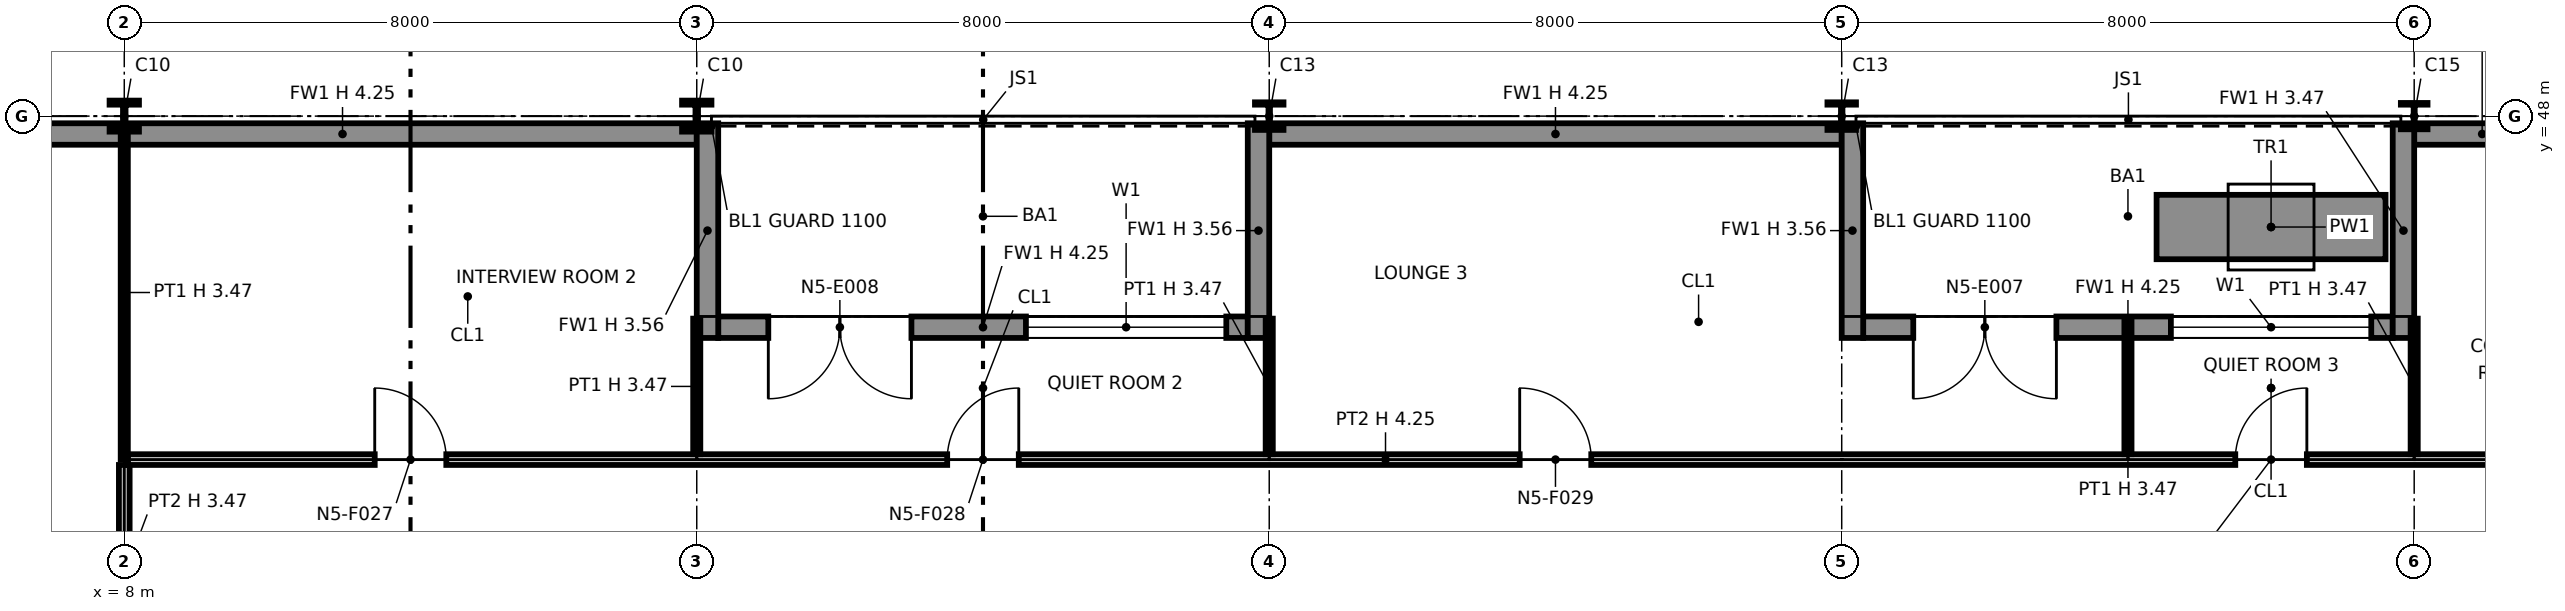
"""IFC4 building model, lengths in metres.
Left out: names, types, materials, properties, quantities, classifications, styles, units other than length and angle.
Written with IfcOpenShell. Run it as: python <this file> out.ifc"""

import sys

from ifc_helpers import new_model, si_unit, direction, frame, frame_2d, origin, origin_2d, place, context, subcontext, project, spatial, rectangle, i_section, extrude, element, fill, save


model = new_model("IFC4")
c1 = context("Model", 3, precision=1e-05, world=origin(), true_north=direction((0.0, 1.0)))
c2 = subcontext(c1, "Body", "Model", "MODEL_VIEW")
j1 = project(units=[si_unit("LENGTHUNIT", "METRE"), si_unit("PLANEANGLEUNIT", "RADIAN")], contexts=[c1])
p1 = place(None, origin())
s1 = spatial("IfcSite", under=j1, at=p1, CompositionType="ELEMENT")
p2 = place(p1, origin())
s2 = spatial("IfcBuilding", under=s1, at=p2, CompositionType="ELEMENT")
p3 = place(p2, frame((0.0, 0.0, 87.6)))
s3 = spatial("IfcBuildingStorey", under=s2, at=p3, CompositionType="ELEMENT", Elevation=87.6)
for number, where, z_axis, x_axis in (
    (1, (8.0, 48.0, 0.0), (0.0, 0.0, 1.0), (1.0, 0.0, 0.0)),
    (2, (16.0, 48.0, 0.0), (0.0, 0.0, 1.0), (1.0, 0.0, 0.0)),
):
    element("IfcColumn", number, at=place(p3, frame(where, z_axis=z_axis, x_axis=x_axis)), inside=s3, PredefinedType="COLUMN", context=c2, shape_type="SweptSolid", body=[
        extrude(i_section(OverallWidth=0.411, OverallDepth=0.434, WebThickness=0.036, FlangeThickness=0.057, at=origin_2d()), origin(), (0.0, 0.0, 1.0), 4.25),
    ])
for number, where, z_axis, x_axis in (
    (3, (24.0, 48.0, 0.0), (0.0, 0.0, 1.0), (1.0, 0.0, 0.0)),
    (4, (32.0, 48.0, 0.0), (0.0, 0.0, 1.0), (1.0, 0.0, 0.0)),
):
    element("IfcColumn", number, at=place(p3, frame(where, z_axis=z_axis, x_axis=x_axis)), inside=s3, PredefinedType="COLUMN", context=c2, shape_type="SweptSolid", body=[
        extrude(i_section(OverallWidth=0.399, OverallDepth=0.386, WebThickness=0.021, FlangeThickness=0.033, at=origin_2d()), origin(), (0.0, 0.0, 1.0), 4.25),
    ])
p4 = place(p3, frame((40.0, 48.0, 0.0), z_axis=(0.0, 0.0, 1.0), x_axis=(1.0, 0.0, 0.0)))
e5 = element("IfcColumn", 5, at=p4, inside=s3, PredefinedType="COLUMN", context=c2, shape_type="SweptSolid", body=[
    extrude(i_section(OverallWidth=0.373, OverallDepth=0.368, WebThickness=0.015, FlangeThickness=0.024, at=origin_2d()), origin(), (0.0, 0.0, 1.0), 4.25),
])
p5 = place(p3, frame((41.9, 47.75, 0.0), z_axis=(0.0, 0.0, 1.0), x_axis=(-1.0, 0.0, 0.0)))
e6 = element("IfcWall", 6, at=p5, inside=s3, PredefinedType="SOLIDWALL", context=c2, shape_type="SweptSolid", body=[
    extrude(rectangle(XDim=1.9, YDim=0.3, at=frame_2d((0.95, 0.0))), origin(), (0.0, 0.0, 1.0), 4.25),
])
p6 = place(p3, frame((39.7, 45.05, 0.0), z_axis=(0.0, 0.0, 1.0), x_axis=(-1.0, 0.0, 0.0)))
e7 = element("IfcWall", 7, at=p6, inside=s3, PredefinedType="SOLIDWALL", context=c2, shape_type="SweptSolid", body=[
    extrude(rectangle(XDim=7.4, YDim=0.3, at=frame_2d((3.7, 0.0))), origin(), (0.0, 0.0, 1.0), 4.25),
])
p7 = place(p6, frame((0.3, 0.0, 0.9)))
e8 = element("IfcOpeningElement", 8, at=p7, cuts=e7, PredefinedType="OPENING", context=c2, shape_type="SweptSolid", body=[
    extrude(rectangle(XDim=2.8, YDim=2.2, at=frame_2d((1.4, 1.1))), frame((0.0, 0.16, 0.0), z_axis=(0.0, -1.0, 0.0), x_axis=(1.0, 0.0, 0.0)), (0.0, 0.0, 1.0), 0.32),
])
p8 = place(p6, frame((4.7, 0.0, 0.0)))
e9 = element("IfcOpeningElement", 9, at=p8, cuts=e7, PredefinedType="OPENING", context=c2, shape_type="SweptSolid", body=[
    extrude(rectangle(XDim=2.0, YDim=2.4, at=frame_2d((1.0, 1.2))), frame((0.0, 0.16, 0.0), z_axis=(0.0, -1.0, 0.0), x_axis=(1.0, 0.0, 0.0)), (0.0, 0.0, 1.0), 0.32),
])
p9 = place(p3, frame((39.85, 47.9, 0.0), z_axis=(0.0, 0.0, 1.0), x_axis=(0.0, -1.0, 0.0)))
e10 = element("IfcWall", 10, at=p9, inside=s3, PredefinedType="SOLIDWALL", context=c2, shape_type="SweptSolid", body=[
    extrude(rectangle(XDim=3.0, YDim=0.3, at=frame_2d((1.5, 0.0))), origin(), (0.0, 0.0, 1.0), 3.469),
])
p10 = place(p3, frame((32.15, 47.9, 0.0), z_axis=(0.0, 0.0, 1.0), x_axis=(0.0, -1.0, 0.0)))
e11 = element("IfcWall", 11, at=p10, inside=s3, PredefinedType="SOLIDWALL", context=c2, shape_type="SweptSolid", body=[
    extrude(rectangle(XDim=3.0, YDim=0.3, at=frame_2d((1.5, 0.0))), origin(), (0.0, 0.0, 1.0), 3.556),
])
p11 = place(p3, frame((32.0, 47.75, 0.0), z_axis=(0.0, 0.0, 1.0), x_axis=(-1.0, 0.0, 0.0)))
e12 = element("IfcWall", 12, at=p11, inside=s3, PredefinedType="SOLIDWALL", context=c2, shape_type="SweptSolid", body=[
    extrude(rectangle(XDim=8.0, YDim=0.3, at=frame_2d((4.0, 0.0))), origin(), (0.0, 0.0, 1.0), 4.25),
])
p12 = place(p3, frame((23.7, 45.05, 0.0), z_axis=(0.0, 0.0, 1.0), x_axis=(-1.0, 0.0, 0.0)))
e13 = element("IfcWall", 13, at=p12, inside=s3, PredefinedType="SOLIDWALL", context=c2, shape_type="SweptSolid", body=[
    extrude(rectangle(XDim=7.4, YDim=0.3, at=frame_2d((3.7, 0.0))), origin(), (0.0, 0.0, 1.0), 4.25),
])
p13 = place(p12, frame((0.3, 0.0, 0.9)))
e14 = element("IfcOpeningElement", 14, at=p13, cuts=e13, PredefinedType="OPENING", context=c2, shape_type="SweptSolid", body=[
    extrude(rectangle(XDim=2.8, YDim=2.2, at=frame_2d((1.4, 1.1))), frame((0.0, 0.16, 0.0), z_axis=(0.0, -1.0, 0.0), x_axis=(1.0, 0.0, 0.0)), (0.0, 0.0, 1.0), 0.32),
])
p14 = place(p12, frame((4.7, 0.0, 0.0)))
e15 = element("IfcOpeningElement", 15, at=p14, cuts=e13, PredefinedType="OPENING", context=c2, shape_type="SweptSolid", body=[
    extrude(rectangle(XDim=2.0, YDim=2.4, at=frame_2d((1.0, 1.2))), frame((0.0, 0.16, 0.0), z_axis=(0.0, -1.0, 0.0), x_axis=(1.0, 0.0, 0.0)), (0.0, 0.0, 1.0), 0.32),
])
for number, where, z_axis, x_axis in (
    (16, (23.85, 47.9, 0.0), (0.0, 0.0, 1.0), (0.0, -1.0, 0.0)),
    (17, (16.15, 47.9, 0.0), (0.0, 0.0, 1.0), (0.0, -1.0, 0.0)),
):
    element("IfcWall", number, at=place(p3, frame(where, z_axis=z_axis, x_axis=x_axis)), inside=s3, PredefinedType="SOLIDWALL", context=c2, shape_type="SweptSolid", body=[
        extrude(rectangle(XDim=3.0, YDim=0.3, at=frame_2d((1.5, 0.0))), origin(), (0.0, 0.0, 1.0), 3.556),
    ])
p15 = place(p3, frame((16.0, 47.75, 0.0), z_axis=(0.0, 0.0, 1.0), x_axis=(-1.0, 0.0, 0.0)))
e18 = element("IfcWall", 18, at=p15, inside=s3, PredefinedType="SOLIDWALL", context=c2, shape_type="SweptSolid", body=[
    extrude(rectangle(XDim=9.9, YDim=0.3, at=frame_2d((4.95, 0.0))), origin(), (0.0, 0.0, 1.0), 4.25),
])
p16 = place(p3, frame((39.6, 46.45, 0.0), z_axis=(0.0, 0.0, 1.0), x_axis=(-1.0, 0.0, 0.0)))
e19 = element("IfcWall", 19, at=p16, inside=s3, PredefinedType="SOLIDWALL", context=c2, shape_type="SweptSolid", body=[
    extrude(rectangle(XDim=3.2, YDim=0.9, at=frame_2d((1.6, 0.0))), origin(), (0.0, 0.0, 1.0), 0.6),
])
p17 = place(p3, frame((8.0, 40.03, 0.0), z_axis=(0.0, 0.0, 1.0), x_axis=(0.0, 1.0, 0.0)))
e20 = element("IfcWall", 20, at=p17, inside=s3, PredefinedType="PARTITIONING", context=c2, shape_type="SweptSolid", body=[
    extrude(rectangle(XDim=3.095, YDim=0.15, at=frame_2d((1.547, 0.0))), origin(), (0.0, 0.0, 1.0), 3.47),
])
p18 = place(p17, frame((1.07, 0.0, 0.0)))
e21 = element("IfcOpeningElement", 21, at=p18, cuts=e20, PredefinedType="OPENING", context=c2, shape_type="SweptSolid", body=[
    extrude(rectangle(XDim=1.0, YDim=2.1, at=frame_2d((0.5, 1.05))), frame((0.0, 0.085, 0.0), z_axis=(0.0, -1.0, 0.0), x_axis=(1.0, 0.0, 0.0)), (0.0, 0.0, 1.0), 0.17),
])
p19 = place(p3, frame((8.05, 43.2, 0.0), z_axis=(0.0, 0.0, 1.0), x_axis=(1.0, 0.0, 0.0)))
e22 = element("IfcWall", 22, at=p19, inside=s3, PredefinedType="PARTITIONING", context=c2, shape_type="SweptSolid", body=[
    extrude(rectangle(XDim=35.15, YDim=0.15, at=frame_2d((17.575, 0.0))), origin(), (0.0, 0.0, 1.0), 4.25),
])
p20 = place(p19, frame((3.45, 0.0, 0.0)))
e23 = element("IfcOpeningElement", 23, at=p20, cuts=e22, PredefinedType="OPENING", context=c2, shape_type="SweptSolid", body=[
    extrude(rectangle(XDim=1.0, YDim=2.1, at=frame_2d((0.5, 1.05))), frame((0.0, 0.085, 0.0), z_axis=(0.0, -1.0, 0.0), x_axis=(1.0, 0.0, 0.0)), (0.0, 0.0, 1.0), 0.17),
])
p21 = place(p19, frame((11.45, 0.0, 0.0)))
e24 = element("IfcOpeningElement", 24, at=p21, cuts=e22, PredefinedType="OPENING", context=c2, shape_type="SweptSolid", body=[
    extrude(rectangle(XDim=1.0, YDim=2.1, at=frame_2d((0.5, 1.05))), frame((0.0, 0.085, 0.0), z_axis=(0.0, -1.0, 0.0), x_axis=(1.0, 0.0, 0.0)), (0.0, 0.0, 1.0), 0.17),
])
p22 = place(p19, frame((19.45, 0.0, 0.0)))
e25 = element("IfcOpeningElement", 25, at=p22, cuts=e22, PredefinedType="OPENING", context=c2, shape_type="SweptSolid", body=[
    extrude(rectangle(XDim=1.0, YDim=2.1, at=frame_2d((0.5, 1.05))), frame((0.0, 0.085, 0.0), z_axis=(0.0, -1.0, 0.0), x_axis=(1.0, 0.0, 0.0)), (0.0, 0.0, 1.0), 0.17),
])
p23 = place(p19, frame((29.45, 0.0, 0.0)))
e26 = element("IfcOpeningElement", 26, at=p23, cuts=e22, PredefinedType="OPENING", context=c2, shape_type="SweptSolid", body=[
    extrude(rectangle(XDim=1.0, YDim=2.1, at=frame_2d((0.5, 1.05))), frame((0.0, 0.085, 0.0), z_axis=(0.0, -1.0, 0.0), x_axis=(1.0, 0.0, 0.0)), (0.0, 0.0, 1.0), 0.17),
])
p24 = place(p3, frame((8.0, 43.2, 0.0), z_axis=(0.0, 0.0, 1.0), x_axis=(0.0, 1.0, 0.0)))
e27 = element("IfcWall", 27, at=p24, inside=s3, PredefinedType="PARTITIONING", context=c2, shape_type="SweptSolid", body=[
    extrude(rectangle(XDim=4.67, YDim=0.1, at=frame_2d((2.335, 0.0))), origin(), (0.0, 0.0, 1.0), 3.47),
])
for number, where, z_axis, x_axis in (
    (28, (16.0, 43.275, 0.0), (0.0, 0.0, 1.0), (0.0, 1.0, 0.0)),
    (29, (24.0, 43.275, 0.0), (0.0, 0.0, 1.0), (0.0, 1.0, 0.0)),
    (30, (36.0, 43.275, 0.0), (0.0, 0.0, 1.0), (0.0, 1.0, 0.0)),
    (31, (40.0, 43.275, 0.0), (0.0, 0.0, 1.0), (0.0, 1.0, 0.0)),
):
    element("IfcWall", number, at=place(p3, frame(where, z_axis=z_axis, x_axis=x_axis)), inside=s3, PredefinedType="PARTITIONING", context=c2, shape_type="SweptSolid", body=[
        extrude(rectangle(XDim=1.895, YDim=0.1, at=frame_2d((0.948, 0.0))), origin(), (0.0, 0.0, 1.0), 3.47),
    ])
p25 = place(p7, origin())
e32 = element("IfcWindow", 32, at=p25, inside=s3, PartitioningType="SINGLE_PANEL", PredefinedType="WINDOW", context=c2, shape_type="SweptSolid", body=[
    extrude(rectangle(XDim=2.8, YDim=2.2, at=frame_2d((1.4, 1.1))), frame((0.0, 0.03, 0.0), z_axis=(0.0, -1.0, 0.0), x_axis=(1.0, 0.0, 0.0)), (0.0, 0.0, 1.0), 0.06),
])
fill(e8, e32)
p26 = place(p8, origin())
e33 = element("IfcDoor", 33, at=p26, inside=s3, OperationType="DOUBLE_DOOR_SINGLE_SWING", PredefinedType="DOOR", context=c2, shape_type="SweptSolid", body=[
    extrude(rectangle(XDim=2.0, YDim=2.4, at=frame_2d((1.0, 1.2))), frame((0.0, 0.025, 0.0), z_axis=(0.0, -1.0, 0.0), x_axis=(1.0, 0.0, 0.0)), (0.0, 0.0, 1.0), 0.05),
])
fill(e9, e33)
p27 = place(p13, origin())
e34 = element("IfcWindow", 34, at=p27, inside=s3, PartitioningType="SINGLE_PANEL", PredefinedType="WINDOW", context=c2, shape_type="SweptSolid", body=[
    extrude(rectangle(XDim=2.8, YDim=2.2, at=frame_2d((1.4, 1.1))), frame((0.0, 0.03, 0.0), z_axis=(0.0, -1.0, 0.0), x_axis=(1.0, 0.0, 0.0)), (0.0, 0.0, 1.0), 0.06),
])
fill(e14, e34)
p28 = place(p14, origin())
e35 = element("IfcDoor", 35, at=p28, inside=s3, OperationType="DOUBLE_DOOR_SINGLE_SWING", PredefinedType="DOOR", context=c2, shape_type="SweptSolid", body=[
    extrude(rectangle(XDim=2.0, YDim=2.4, at=frame_2d((1.0, 1.2))), frame((0.0, 0.025, 0.0), z_axis=(0.0, -1.0, 0.0), x_axis=(1.0, 0.0, 0.0)), (0.0, 0.0, 1.0), 0.05),
])
fill(e15, e35)
p29 = place(p20, origin())
e36 = element("IfcDoor", 36, at=p29, inside=s3, OperationType="SINGLE_SWING_LEFT", PredefinedType="DOOR", context=c2, shape_type="SweptSolid", body=[
    extrude(rectangle(XDim=1.0, YDim=2.1, at=frame_2d((0.5, 1.05))), frame((0.0, 0.025, 0.0), z_axis=(0.0, -1.0, 0.0), x_axis=(1.0, 0.0, 0.0)), (0.0, 0.0, 1.0), 0.05),
])
fill(e23, e36)
p30 = place(p21, origin())
e37 = element("IfcDoor", 37, at=p30, inside=s3, OperationType="SINGLE_SWING_RIGHT", PredefinedType="DOOR", context=c2, shape_type="SweptSolid", body=[
    extrude(rectangle(XDim=1.0, YDim=2.1, at=frame_2d((0.5, 1.05))), frame((0.0, 0.025, 0.0), z_axis=(0.0, -1.0, 0.0), x_axis=(1.0, 0.0, 0.0)), (0.0, 0.0, 1.0), 0.05),
])
fill(e24, e37)
p31 = place(p22, origin())
e38 = element("IfcDoor", 38, at=p31, inside=s3, OperationType="SINGLE_SWING_LEFT", PredefinedType="DOOR", context=c2, shape_type="SweptSolid", body=[
    extrude(rectangle(XDim=1.0, YDim=2.1, at=frame_2d((0.5, 1.05))), frame((0.0, 0.025, 0.0), z_axis=(0.0, -1.0, 0.0), x_axis=(1.0, 0.0, 0.0)), (0.0, 0.0, 1.0), 0.05),
])
fill(e25, e38)
p32 = place(p23, origin())
e39 = element("IfcDoor", 39, at=p32, inside=s3, OperationType="SINGLE_SWING_RIGHT", PredefinedType="DOOR", context=c2, shape_type="SweptSolid", body=[
    extrude(rectangle(XDim=1.0, YDim=2.1, at=frame_2d((0.5, 1.05))), frame((0.0, 0.025, 0.0), z_axis=(0.0, -1.0, 0.0), x_axis=(1.0, 0.0, 0.0)), (0.0, 0.0, 1.0), 0.05),
])
fill(e26, e39)
save(model, sys.argv[1])
